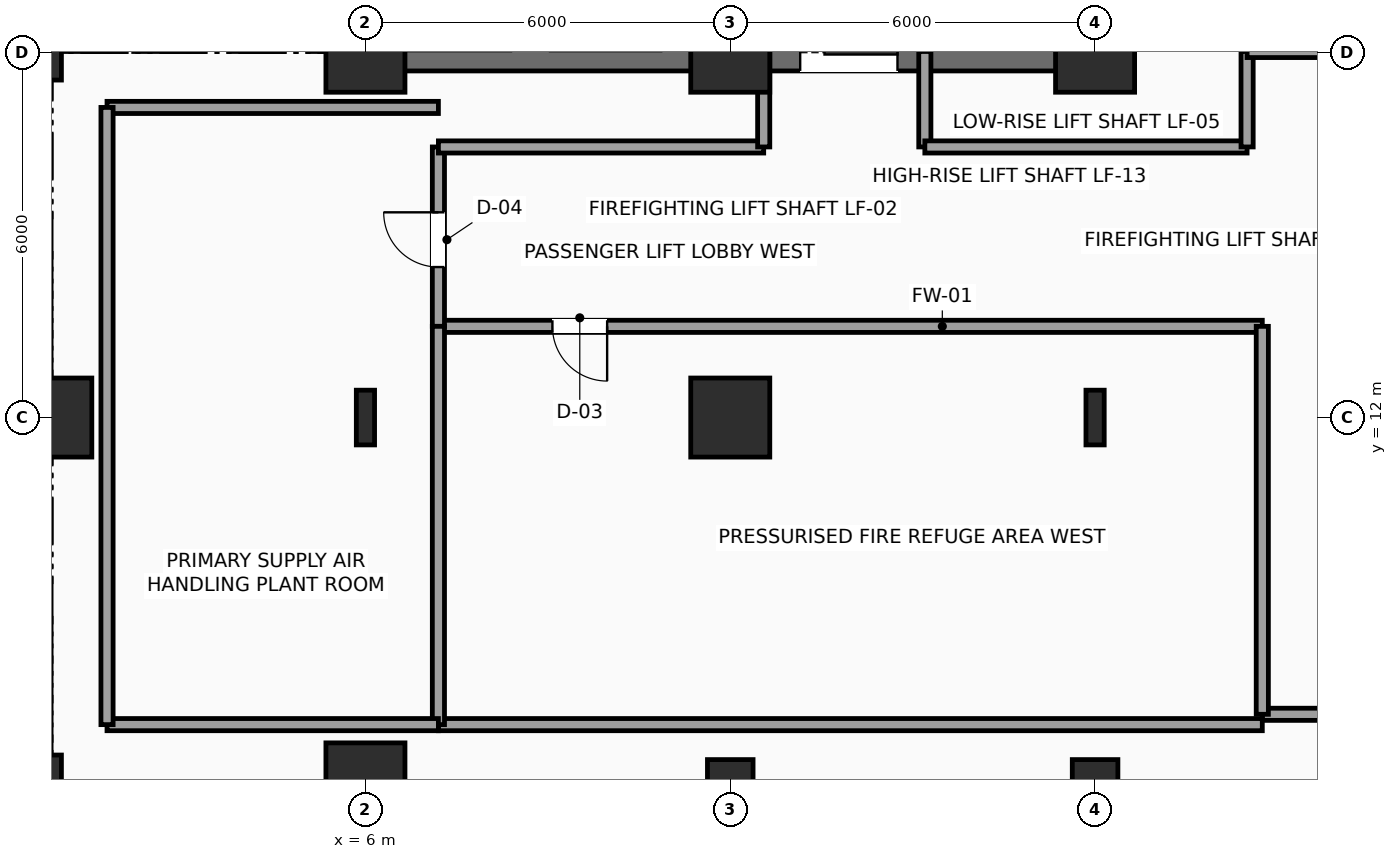
"""IFC4 building model, lengths in metres.
Left out: names, types, materials, properties, quantities, classifications, styles, units other than length and angle.
Written with IfcOpenShell. Run it as: python <this file> out.ifc"""

import sys

from ifc_helpers import new_model, si_unit, direction, frame, frame_2d, origin, origin_2d, place, context, subcontext, project, spatial, rectangle, hollow_rectangle, i_section, extrude, element, fill, save


model = new_model("IFC4")
c1 = context("Model", 3, precision=1e-05, world=origin(), true_north=direction((0.0, 1.0)))
c2 = subcontext(c1, "Body", "Model", "MODEL_VIEW")
j1 = project(units=[si_unit("LENGTHUNIT", "METRE"), si_unit("PLANEANGLEUNIT", "RADIAN")], contexts=[c1])
p1 = place(None, origin())
s1 = spatial("IfcSite", under=j1, at=p1, CompositionType="ELEMENT")
p2 = place(p1, origin())
s2 = spatial("IfcBuilding", under=s1, at=p2, CompositionType="ELEMENT")
p3 = place(p2, frame((0.0, 0.0, 94.8)))
s3 = spatial("IfcBuildingStorey", under=s2, at=p3, CompositionType="ELEMENT", Elevation=94.8)
for number, where, z_axis, x_axis in (
    (1, (6.0, 18.0, 0.0), (0.0, 0.0, 1.0), (1.0, 0.0, 0.0)),
    (2, (12.0, 18.0, 0.0), (0.0, 0.0, 1.0), (1.0, 0.0, 0.0)),
    (3, (18.0, 18.0, 0.0), (0.0, 0.0, 1.0), (1.0, 0.0, 0.0)),
):
    element("IfcColumn", number, at=place(p3, frame(where, z_axis=z_axis, x_axis=x_axis)), inside=s3, PredefinedType="COLUMN", context=c2, shape_type="SweptSolid", body=[
        extrude(rectangle(XDim=1.3, YDim=1.3, at=origin_2d()), origin(), (0.0, 0.0, 1.0), 4.8),
    ])
p4 = place(p3, frame((0.85, 6.0, 0.0), z_axis=(0.0, 0.0, 1.0), x_axis=(1.0, 0.0, 0.0)))
e4 = element("IfcColumn", 4, at=p4, inside=s3, PredefinedType="COLUMN", context=c2, shape_type="SweptSolid", body=[
    extrude(i_section(OverallWidth=0.3, OverallDepth=0.9, WebThickness=0.019, FlangeThickness=0.035, FilletRadius=0.03, at=origin_2d()), origin(), (0.0, 0.0, 1.0), 4.8),
])
p5 = place(p3, frame((0.85, 12.0, 0.0), z_axis=(0.0, 0.0, 1.0), x_axis=(1.0, 0.0, 0.0)))
e5 = element("IfcColumn", 5, at=p5, inside=s3, PredefinedType="COLUMN", context=c2, shape_type="SweptSolid", body=[
    extrude(rectangle(XDim=1.3, YDim=1.3, at=origin_2d()), origin(), (0.0, 0.0, 1.0), 4.8),
])
p6 = place(p3, frame((0.85, 18.0, 0.0), z_axis=(0.0, 0.0, 1.0), x_axis=(1.0, 0.0, 0.0)))
e6 = element("IfcColumn", 6, at=p6, inside=s3, PredefinedType="COLUMN", context=c2, shape_type="SweptSolid", body=[
    extrude(i_section(OverallWidth=0.3, OverallDepth=0.9, WebThickness=0.019, FlangeThickness=0.035, FilletRadius=0.03, at=origin_2d()), origin(), (0.0, 0.0, 1.0), 4.8),
])
p7 = place(p3, frame((6.0, 6.0, 0.0), z_axis=(0.0, 0.0, 1.0), x_axis=(1.0, 0.0, 0.0)))
e7 = element("IfcColumn", 7, at=p7, inside=s3, PredefinedType="COLUMN", context=c2, shape_type="SweptSolid", body=[
    extrude(rectangle(XDim=1.3, YDim=1.3, at=origin_2d()), origin(), (0.0, 0.0, 1.0), 4.8),
])
p8 = place(p3, frame((6.0, 12.0, 0.0), z_axis=(0.0, 0.0, 1.0), x_axis=(1.0, 0.0, 0.0)))
e8 = element("IfcColumn", 8, at=p8, inside=s3, PredefinedType="COLUMN", context=c2, shape_type="SweptSolid", body=[
    extrude(i_section(OverallWidth=0.3, OverallDepth=0.9, WebThickness=0.019, FlangeThickness=0.035, FilletRadius=0.03, at=origin_2d()), origin(), (0.0, 0.0, 1.0), 4.8),
])
p9 = place(p3, frame((12.0, 6.0, 0.0), z_axis=(0.0, 0.0, 1.0), x_axis=(1.0, 0.0, 0.0)))
e9 = element("IfcColumn", 9, at=p9, inside=s3, PredefinedType="COLUMN", context=c2, shape_type="SweptSolid", body=[
    extrude(hollow_rectangle(XDim=0.75, YDim=0.75, WallThickness=0.035, InnerFilletRadius=0.035, OuterFilletRadius=0.05, at=origin_2d()), origin(), (0.0, 0.0, 1.0), 4.8),
])
p10 = place(p3, frame((12.0, 12.0, 0.0), z_axis=(0.0, 0.0, 1.0), x_axis=(1.0, 0.0, 0.0)))
e10 = element("IfcColumn", 10, at=p10, inside=s3, PredefinedType="COLUMN", context=c2, shape_type="SweptSolid", body=[
    extrude(rectangle(XDim=1.3, YDim=1.3, at=origin_2d()), origin(), (0.0, 0.0, 1.0), 4.8),
])
p11 = place(p3, frame((18.0, 6.0, 0.0), z_axis=(0.0, 0.0, 1.0), x_axis=(1.0, 0.0, 0.0)))
e11 = element("IfcColumn", 11, at=p11, inside=s3, PredefinedType="COLUMN", context=c2, shape_type="SweptSolid", body=[
    extrude(hollow_rectangle(XDim=0.75, YDim=0.75, WallThickness=0.035, InnerFilletRadius=0.035, OuterFilletRadius=0.05, at=origin_2d()), origin(), (0.0, 0.0, 1.0), 4.8),
])
p12 = place(p3, frame((18.0, 12.0, 0.0), z_axis=(0.0, 0.0, 1.0), x_axis=(1.0, 0.0, 0.0)))
e12 = element("IfcColumn", 12, at=p12, inside=s3, PredefinedType="COLUMN", context=c2, shape_type="SweptSolid", body=[
    extrude(i_section(OverallWidth=0.3, OverallDepth=0.9, WebThickness=0.019, FlangeThickness=0.035, FilletRadius=0.03, at=origin_2d()), origin(), (0.0, 0.0, 1.0), 4.8),
])
p13 = place(p3, frame((6.0, 18.0, 0.0), z_axis=(0.0, 0.0, 1.0), x_axis=(1.0, 0.0, 0.0)))
e13 = element("IfcWall", 13, at=p13, inside=s3, PredefinedType="SHEAR", context=c2, shape_type="SweptSolid", body=[
    extrude(rectangle(XDim=12.0, YDim=0.6, at=frame_2d((6.0, 0.0))), origin(), (0.0, 0.0, 1.0), 4.575),
])
p14 = place(p13, frame((7.15, 0.0, 0.0)))
e14 = element("IfcOpeningElement", 14, at=p14, cuts=e13, PredefinedType="OPENING", context=c2, shape_type="SweptSolid", body=[
    extrude(rectangle(XDim=1.6, YDim=2.3, at=frame_2d((0.8, 1.15))), frame((0.0, 0.31, 0.0), z_axis=(0.0, -1.0, 0.0), x_axis=(1.0, 0.0, 0.0)), (0.0, 0.0, 1.0), 0.62),
])
p15 = place(p3, frame((20.75, 13.5, 0.0), z_axis=(0.0, 0.0, 1.0), x_axis=(-1.0, 0.0, 0.0)))
e15 = element("IfcWall", 15, at=p15, inside=s3, PredefinedType="SOLIDWALL", context=c2, shape_type="SweptSolid", body=[
    extrude(rectangle(XDim=13.55, YDim=0.2, at=frame_2d((6.775, 0.0))), origin(), (0.0, 0.0, 1.0), 4.575),
])
p16 = place(p15, frame((10.775, 0.0, 0.0)))
e16 = element("IfcOpeningElement", 16, at=p16, cuts=e15, PredefinedType="OPENING", context=c2, shape_type="SweptSolid", body=[
    extrude(rectangle(XDim=0.9, YDim=2.15, at=frame_2d((0.45, 1.075))), frame((0.0, 0.11, 0.0), z_axis=(0.0, -1.0, 0.0), x_axis=(1.0, 0.0, 0.0)), (0.0, 0.0, 1.0), 0.22),
])
p17 = place(p3, frame((7.2, 13.5, 0.0), z_axis=(0.0, 0.0, 1.0), x_axis=(0.0, 1.0, 0.0)))
e17 = element("IfcWall", 17, at=p17, inside=s3, PredefinedType="SOLIDWALL", context=c2, shape_type="SweptSolid", body=[
    extrude(rectangle(XDim=2.95, YDim=0.2, at=frame_2d((1.475, 0.0))), origin(), (0.0, 0.0, 1.0), 4.575),
])
p18 = place(p17, frame((0.975, 0.0, 0.0)))
e18 = element("IfcOpeningElement", 18, at=p18, cuts=e17, PredefinedType="OPENING", context=c2, shape_type="SweptSolid", body=[
    extrude(rectangle(XDim=0.9, YDim=2.15, at=frame_2d((0.45, 1.075))), frame((0.0, 0.11, 0.0), z_axis=(0.0, -1.0, 0.0), x_axis=(1.0, 0.0, 0.0)), (0.0, 0.0, 1.0), 0.22),
])
p19 = place(p3, frame((7.2, 16.45, 0.0), z_axis=(0.0, 0.0, 1.0), x_axis=(1.0, 0.0, 0.0)))
e19 = element("IfcWall", 19, at=p19, inside=s3, PredefinedType="SOLIDWALL", context=c2, shape_type="SweptSolid", body=[
    extrude(rectangle(XDim=5.35, YDim=0.2, at=frame_2d((2.675, 0.0))), origin(), (0.0, 0.0, 1.0), 4.575),
])
for number, where, z_axis, x_axis in (
    (20, (12.55, 16.45, 0.0), (0.0, 0.0, 1.0), (0.0, 1.0, 0.0)),
    (21, (15.2, 18.02, 0.0), (0.0, 0.0, 1.0), (0.0, -1.0, 0.0)),
):
    element("IfcWall", number, at=place(p3, frame(where, z_axis=z_axis, x_axis=x_axis)), inside=s3, PredefinedType="SOLIDWALL", context=c2, shape_type="SweptSolid", body=[
        extrude(rectangle(XDim=1.57, YDim=0.2, at=frame_2d((0.785, 0.0))), origin(), (0.0, 0.0, 1.0), 4.575),
    ])
p20 = place(p3, frame((15.2, 16.45, 0.0), z_axis=(0.0, 0.0, 1.0), x_axis=(1.0, 0.0, 0.0)))
e22 = element("IfcWall", 22, at=p20, inside=s3, PredefinedType="SOLIDWALL", context=c2, shape_type="SweptSolid", body=[
    extrude(rectangle(XDim=5.3, YDim=0.2, at=frame_2d((2.65, 0.0))), origin(), (0.0, 0.0, 1.0), 4.575),
])
p21 = place(p3, frame((20.5, 16.45, 0.0), z_axis=(0.0, 0.0, 1.0), x_axis=(0.0, 1.0, 0.0)))
e23 = element("IfcWall", 23, at=p21, inside=s3, PredefinedType="SOLIDWALL", context=c2, shape_type="SweptSolid", body=[
    extrude(rectangle(XDim=1.57, YDim=0.2, at=frame_2d((0.785, 0.0))), origin(), (0.0, 0.0, 1.0), 4.575),
])
p22 = place(p3, frame((20.5, 18.02, 0.0), z_axis=(0.0, 0.0, 1.0), x_axis=(1.0, 0.0, 0.0)))
e24 = element("IfcWall", 24, at=p22, inside=s3, PredefinedType="SOLIDWALL", context=c2, shape_type="SweptSolid", body=[
    extrude(rectangle(XDim=1.52, YDim=0.2, at=frame_2d((0.76, 0.0))), origin(), (0.0, 0.0, 1.0), 4.067),
])
p23 = place(p3, frame((23.98, 7.12, 0.0), z_axis=(0.0, 0.0, 1.0), x_axis=(-1.0, 0.0, 0.0)))
e25 = element("IfcWall", 25, at=p23, inside=s3, PredefinedType="SOLIDWALL", context=c2, shape_type="SweptSolid", body=[
    extrude(rectangle(XDim=3.23, YDim=0.2, at=frame_2d((1.615, 0.0))), origin(), (0.0, 0.0, 1.0), 4.575),
])
p24 = place(p3, frame((20.75, 7.12, 0.0), z_axis=(0.0, 0.0, 1.0), x_axis=(0.0, 1.0, 0.0)))
e26 = element("IfcWall", 26, at=p24, inside=s3, PredefinedType="SOLIDWALL", context=c2, shape_type="SweptSolid", body=[
    extrude(rectangle(XDim=6.38, YDim=0.2, at=frame_2d((3.19, 0.0))), origin(), (0.0, 0.0, 1.0), 4.575),
])
p25 = place(p3, frame((7.2, 6.95, 0.0), z_axis=(0.0, 0.0, 1.0), x_axis=(1.0, 0.0, 0.0)))
e27 = element("IfcWall", 27, at=p25, inside=s3, PredefinedType="SOLIDWALL", context=c2, shape_type="SweptSolid", body=[
    extrude(rectangle(XDim=13.55, YDim=0.2, at=frame_2d((6.775, 0.0))), origin(), (0.0, 0.0, 1.0), 4.575),
])
p26 = place(p3, frame((7.2, 6.95, 0.0), z_axis=(0.0, 0.0, 1.0), x_axis=(0.0, 1.0, 0.0)))
e28 = element("IfcWall", 28, at=p26, inside=s3, PredefinedType="SOLIDWALL", context=c2, shape_type="SweptSolid", body=[
    extrude(rectangle(XDim=6.55, YDim=0.2, at=frame_2d((3.275, 0.0))), origin(), (0.0, 0.0, 1.0), 4.575),
])
for number, where, z_axis, x_axis in (
    (29, (1.75, 6.95, 0.0), (0.0, 0.0, 1.0), (1.0, 0.0, 0.0)),
    (30, (1.75, 17.1, 0.0), (0.0, 0.0, 1.0), (1.0, 0.0, 0.0)),
):
    element("IfcWall", number, at=place(p3, frame(where, z_axis=z_axis, x_axis=x_axis)), inside=s3, PredefinedType="SOLIDWALL", context=c2, shape_type="SweptSolid", body=[
        extrude(rectangle(XDim=5.45, YDim=0.2, at=frame_2d((2.725, 0.0))), origin(), (0.0, 0.0, 1.0), 4.575),
    ])
p27 = place(p3, frame((1.75, 6.95, 0.0), z_axis=(0.0, 0.0, 1.0), x_axis=(0.0, 1.0, 0.0)))
e31 = element("IfcWall", 31, at=p27, inside=s3, PredefinedType="SOLIDWALL", context=c2, shape_type="SweptSolid", body=[
    extrude(rectangle(XDim=10.15, YDim=0.2, at=frame_2d((5.075, 0.0))), origin(), (0.0, 0.0, 1.0), 4.575),
])
p28 = place(p14, origin())
e32 = element("IfcDoor", 32, at=p28, inside=s3, OperationType="DOUBLE_DOOR_SLIDING", PredefinedType="DOOR", context=c2, shape_type="SweptSolid", body=[
    extrude(rectangle(XDim=1.6, YDim=2.3, at=frame_2d((0.8, 1.15))), frame((0.0, 0.025, 0.0), z_axis=(0.0, -1.0, 0.0), x_axis=(1.0, 0.0, 0.0)), (0.0, 0.0, 1.0), 0.05),
])
fill(e14, e32)
p29 = place(p16, origin())
e33 = element("IfcDoor", 33, at=p29, inside=s3, OperationType="SINGLE_SWING_LEFT", PredefinedType="DOOR", context=c2, shape_type="SweptSolid", body=[
    extrude(rectangle(XDim=0.9, YDim=2.15, at=frame_2d((0.45, 1.075))), frame((0.0, 0.025, 0.0), z_axis=(0.0, -1.0, 0.0), x_axis=(1.0, 0.0, 0.0)), (0.0, 0.0, 1.0), 0.05),
])
fill(e16, e33)
p30 = place(p18, origin())
e34 = element("IfcDoor", 34, at=p30, inside=s3, OperationType="SINGLE_SWING_RIGHT", PredefinedType="DOOR", context=c2, shape_type="SweptSolid", body=[
    extrude(rectangle(XDim=0.9, YDim=2.15, at=frame_2d((0.45, 1.075))), frame((0.0, 0.025, 0.0), z_axis=(0.0, -1.0, 0.0), x_axis=(1.0, 0.0, 0.0)), (0.0, 0.0, 1.0), 0.05),
])
fill(e18, e34)
save(model, sys.argv[1])
